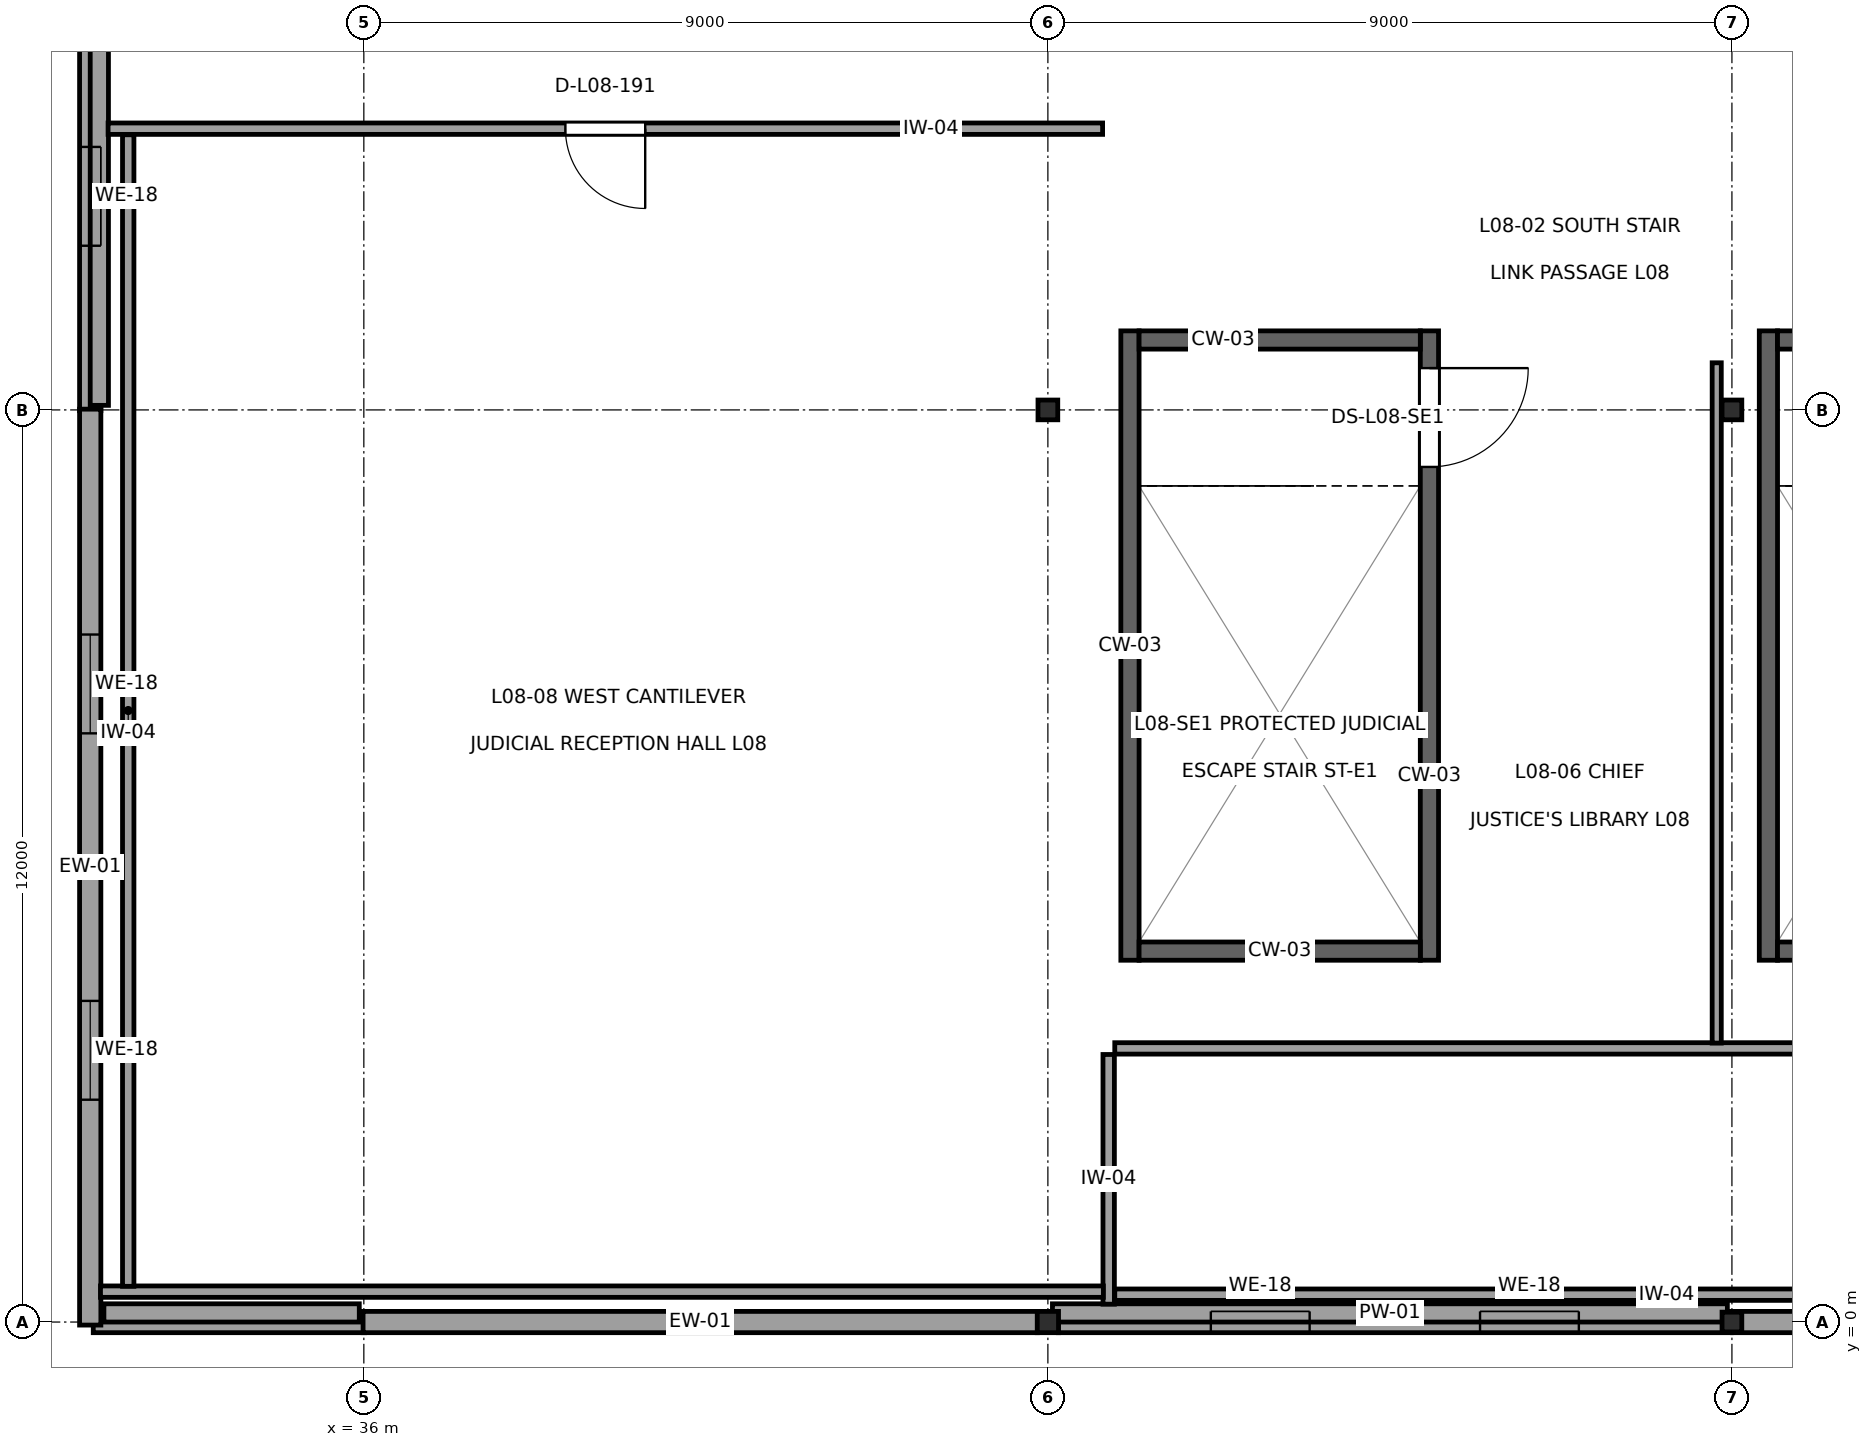
"""IFC4 building model, lengths in metres.
Left out: names, types, materials, properties, quantities, classifications, styles, units other than length and angle.
Written with IfcOpenShell. Run it as: python <this file> out.ifc"""

import sys

from ifc_helpers import new_model, si_unit, direction, frame, frame_2d, origin, origin_2d, place, context, subcontext, project, spatial, rectangle, i_section, extrude, element, fill, save


model = new_model("IFC4")
c1 = context("Model", 3, precision=1e-05, world=origin(), true_north=direction((0.0, 1.0)))
c2 = subcontext(c1, "Body", "Model", "MODEL_VIEW")
j1 = project(units=[si_unit("LENGTHUNIT", "METRE"), si_unit("PLANEANGLEUNIT", "RADIAN")], contexts=[c1])
p1 = place(None, origin())
s1 = spatial("IfcSite", under=j1, at=p1, CompositionType="ELEMENT")
p2 = place(p1, origin())
s2 = spatial("IfcBuilding", under=s1, at=p2, CompositionType="ELEMENT")
p3 = place(p2, frame((0.0, 0.0, 35.4)))
s3 = spatial("IfcBuildingStorey", under=s2, at=p3, CompositionType="ELEMENT", Elevation=35.4)
p4 = place(p3, frame((45.0, 0.0, 0.0), z_axis=(0.0, 0.0, 1.0), x_axis=(0.0, 1.0, 0.0)))
e1 = element("IfcColumn", 1, at=p4, inside=s3, PredefinedType="COLUMN", context=c2, shape_type="SweptSolid", body=[
    extrude(i_section(OverallWidth=0.28, OverallDepth=0.28, WebThickness=0.01, FlangeThickness=0.018, at=origin_2d()), origin(), (0.0, 0.0, 1.0), 3.8),
])
for number, where, z_axis, x_axis in (
    (2, (45.0, 12.0, 0.0), (0.0, 0.0, 1.0), (1.0, 0.0, 0.0)),
    (3, (54.0, 0.0, 0.0), (0.0, 0.0, 1.0), (1.0, 0.0, 0.0)),
    (4, (54.0, 12.0, 0.0), (0.0, 0.0, 1.0), (1.0, 0.0, 0.0)),
):
    element("IfcColumn", number, at=place(p3, frame(where, z_axis=z_axis, x_axis=x_axis)), inside=s3, PredefinedType="COLUMN", context=c2, shape_type="SweptSolid", body=[
        extrude(i_section(OverallWidth=0.26, OverallDepth=0.26, WebThickness=0.01, FlangeThickness=0.018, at=origin_2d()), origin(), (0.0, 0.0, 1.0), 3.8),
    ])
p5 = place(p3, frame((32.44, 0.0, 0.0), z_axis=(0.0, 0.0, 1.0), x_axis=(1.0, 0.0, 0.0)))
e5 = element("IfcWall", 5, at=p5, inside=s3, PredefinedType="SOLIDWALL", context=c2, shape_type="SweptSolid", body=[
    extrude(rectangle(XDim=3.57, YDim=0.28, at=frame_2d((1.785, 0.0))), origin(), (0.0, 0.0, 1.0), 2.787),
])
p6 = place(p3, frame((35.99, 0.0, 0.0), z_axis=(0.0, 0.0, 1.0), x_axis=(1.0, 0.0, 0.0)))
e6 = element("IfcWall", 6, at=p6, inside=s3, PredefinedType="SOLIDWALL", context=c2, shape_type="SweptSolid", body=[
    extrude(rectangle(XDim=8.872, YDim=0.28, at=frame_2d((4.436, 0.0))), origin(), (0.0, 0.0, 1.0), 2.787),
])
p7 = place(p3, frame((45.138, 0.0, 0.0), z_axis=(0.0, 0.0, 1.0), x_axis=(1.0, 0.0, 0.0)))
e7 = element("IfcWall", 7, at=p7, inside=s3, PredefinedType="SOLIDWALL", context=c2, shape_type="SweptSolid", body=[
    extrude(rectangle(XDim=8.854, YDim=0.28, at=frame_2d((4.427, 0.0))), origin(), (0.0, 0.0, 1.0), 2.787),
])
p8 = place(p7, frame((2.006, 0.0, 1.05)))
e8 = element("IfcOpeningElement", 8, at=p8, cuts=e7, PredefinedType="OPENING", context=c2, shape_type="SweptSolid", body=[
    extrude(rectangle(XDim=1.3, YDim=1.3, at=frame_2d((0.65, 0.65))), frame((0.0, 0.155, 0.0), z_axis=(0.0, -1.0, 0.0), x_axis=(1.0, 0.0, 0.0)), (0.0, 0.0, 1.0), 0.31),
])
p9 = place(p7, frame((5.548, 0.0, 1.05)))
e9 = element("IfcOpeningElement", 9, at=p9, cuts=e7, PredefinedType="OPENING", context=c2, shape_type="SweptSolid", body=[
    extrude(rectangle(XDim=1.3, YDim=1.3, at=frame_2d((0.65, 0.65))), frame((0.0, 0.155, 0.0), z_axis=(0.0, -1.0, 0.0), x_axis=(1.0, 0.0, 0.0)), (0.0, 0.0, 1.0), 0.31),
])
p10 = place(p3, frame((54.008, 0.0, 0.0), z_axis=(0.0, 0.0, 1.0), x_axis=(1.0, 0.0, 0.0)))
e10 = element("IfcWall", 10, at=p10, inside=s3, PredefinedType="SOLIDWALL", context=c2, shape_type="SweptSolid", body=[
    extrude(rectangle(XDim=8.984, YDim=0.28, at=frame_2d((4.492, 0.0))), origin(), (0.0, 0.0, 1.0), 2.787),
])
p11 = place(p10, frame((2.045, 0.0, 1.05)))
e11 = element("IfcOpeningElement", 11, at=p11, cuts=e10, PredefinedType="OPENING", context=c2, shape_type="SweptSolid", body=[
    extrude(rectangle(XDim=1.3, YDim=1.3, at=frame_2d((0.65, 0.65))), frame((0.0, 0.155, 0.0), z_axis=(0.0, -1.0, 0.0), x_axis=(1.0, 0.0, 0.0)), (0.0, 0.0, 1.0), 0.31),
])
p12 = place(p10, frame((5.639, 0.0, 1.05)))
e12 = element("IfcOpeningElement", 12, at=p12, cuts=e10, PredefinedType="OPENING", context=c2, shape_type="SweptSolid", body=[
    extrude(rectangle(XDim=1.3, YDim=1.3, at=frame_2d((0.65, 0.65))), frame((0.0, 0.155, 0.0), z_axis=(0.0, -1.0, 0.0), x_axis=(1.0, 0.0, 0.0)), (0.0, 0.0, 1.0), 0.31),
])
p13 = place(p3, frame((32.4, 23.96, 0.0), z_axis=(0.0, 0.0, 1.0), x_axis=(0.0, -1.0, 0.0)))
e13 = element("IfcWall", 13, at=p13, inside=s3, PredefinedType="SOLIDWALL", context=c2, shape_type="SweptSolid", body=[
    extrude(rectangle(XDim=11.97, YDim=0.28, at=frame_2d((5.985, 0.0))), origin(), (0.0, 0.0, 1.0), 3.095),
])
p14 = place(p13, frame((2.941, 0.0, 1.05)))
e14 = element("IfcOpeningElement", 14, at=p14, cuts=e13, PredefinedType="OPENING", context=c2, shape_type="SweptSolid", body=[
    extrude(rectangle(XDim=1.3, YDim=1.3, at=frame_2d((0.65, 0.65))), frame((0.0, 0.155, 0.0), z_axis=(0.0, -1.0, 0.0), x_axis=(1.0, 0.0, 0.0)), (0.0, 0.0, 1.0), 0.31),
])
p15 = place(p13, frame((8.5, 0.0, 1.05)))
e15 = element("IfcOpeningElement", 15, at=p15, cuts=e13, PredefinedType="OPENING", context=c2, shape_type="SweptSolid", body=[
    extrude(rectangle(XDim=1.3, YDim=1.3, at=frame_2d((0.65, 0.65))), frame((0.0, 0.155, 0.0), z_axis=(0.0, -1.0, 0.0), x_axis=(1.0, 0.0, 0.0)), (0.0, 0.0, 1.0), 0.31),
])
p16 = place(p3, frame((32.4, 12.01, 0.0), z_axis=(0.0, 0.0, 1.0), x_axis=(0.0, -1.0, 0.0)))
e16 = element("IfcWall", 16, at=p16, inside=s3, PredefinedType="SOLIDWALL", context=c2, shape_type="SweptSolid", body=[
    extrude(rectangle(XDim=12.05, YDim=0.28, at=frame_2d((6.025, 0.0))), origin(), (0.0, 0.0, 1.0), 3.095),
])
p17 = place(p16, frame((2.965, 0.0, 1.05)))
e17 = element("IfcOpeningElement", 17, at=p17, cuts=e16, PredefinedType="OPENING", context=c2, shape_type="SweptSolid", body=[
    extrude(rectangle(XDim=1.3, YDim=1.3, at=frame_2d((0.65, 0.65))), frame((0.0, 0.155, 0.0), z_axis=(0.0, -1.0, 0.0), x_axis=(1.0, 0.0, 0.0)), (0.0, 0.0, 1.0), 0.31),
])
p18 = place(p16, frame((7.785, 0.0, 1.05)))
e18 = element("IfcOpeningElement", 18, at=p18, cuts=e16, PredefinedType="OPENING", context=c2, shape_type="SweptSolid", body=[
    extrude(rectangle(XDim=1.3, YDim=1.3, at=frame_2d((0.65, 0.65))), frame((0.0, 0.155, 0.0), z_axis=(0.0, -1.0, 0.0), x_axis=(1.0, 0.0, 0.0)), (0.0, 0.0, 1.0), 0.31),
])
p19 = place(p3, frame((32.58, 0.12, 3.8), z_axis=(0.0, 0.0, 1.0), x_axis=(1.0, 0.0, 0.0)))
e19 = element("IfcWall", 19, at=p19, inside=s3, PredefinedType="PARAPET", context=c2, shape_type="SweptSolid", body=[
    extrude(rectangle(XDim=3.36, YDim=0.24, at=frame_2d((1.68, 0.0))), origin(), (0.0, 0.0, 1.0), 1.1),
])
p20 = place(p3, frame((45.06, 0.12, 3.8), z_axis=(0.0, 0.0, 1.0), x_axis=(1.0, 0.0, 0.0)))
e20 = element("IfcWall", 20, at=p20, inside=s3, PredefinedType="PARAPET", context=c2, shape_type="SweptSolid", body=[
    extrude(rectangle(XDim=8.88, YDim=0.24, at=frame_2d((4.44, 0.0))), origin(), (0.0, 0.0, 1.0), 1.1),
])
p21 = place(p3, frame((32.52, 23.58, 3.8), z_axis=(0.0, 0.0, 1.0), x_axis=(0.0, -1.0, 0.0)))
e21 = element("IfcWall", 21, at=p21, inside=s3, PredefinedType="PARAPET", context=c2, shape_type="SweptSolid", body=[
    extrude(rectangle(XDim=11.52, YDim=0.24, at=frame_2d((5.76, 0.0))), origin(), (0.0, 0.0, 1.0), 1.1),
])
p22 = place(p3, frame((54.48, 4.76, 0.0), z_axis=(0.0, 0.0, 1.0), x_axis=(0.0, 1.0, 0.0)))
e22 = element("IfcWall", 22, at=p22, inside=s3, PredefinedType="SHEAR", context=c2, shape_type="SweptSolid", body=[
    extrude(rectangle(XDim=8.28, YDim=0.24, at=frame_2d((4.14, 0.0))), origin(), (0.0, 0.0, 1.0), 3.81),
])
for number, where, z_axis, x_axis in (
    (23, (54.6, 4.88, 0.0), (0.0, 0.0, 1.0), (1.0, 0.0, 0.0)),
    (24, (54.6, 12.92, 0.0), (0.0, 0.0, 1.0), (1.0, 0.0, 0.0)),
):
    element("IfcWall", number, at=place(p3, frame(where, z_axis=z_axis, x_axis=x_axis)), inside=s3, PredefinedType="SHEAR", context=c2, shape_type="SweptSolid", body=[
        extrude(rectangle(XDim=3.7, YDim=0.24, at=frame_2d((1.85, 0.0))), origin(), (0.0, 0.0, 1.0), 3.81),
    ])
p23 = place(p3, frame((46.08, 4.76, 0.0), z_axis=(0.0, 0.0, 1.0), x_axis=(0.0, 1.0, 0.0)))
e25 = element("IfcWall", 25, at=p23, inside=s3, PredefinedType="SHEAR", context=c2, shape_type="SweptSolid", body=[
    extrude(rectangle(XDim=8.28, YDim=0.24, at=frame_2d((4.14, 0.0))), origin(), (0.0, 0.0, 1.0), 3.81),
])
p24 = place(p3, frame((50.02, 4.76, 0.0), z_axis=(0.0, 0.0, 1.0), x_axis=(0.0, 1.0, 0.0)))
e26 = element("IfcWall", 26, at=p24, inside=s3, PredefinedType="SHEAR", context=c2, shape_type="SweptSolid", body=[
    extrude(rectangle(XDim=8.28, YDim=0.24, at=frame_2d((4.14, 0.0))), origin(), (0.0, 0.0, 1.0), 3.81),
])
p25 = place(p24, frame((6.49, 0.0, 0.0)))
e27 = element("IfcOpeningElement", 27, at=p25, cuts=e26, PredefinedType="OPENING", context=c2, shape_type="SweptSolid", body=[
    extrude(rectangle(XDim=1.3, YDim=2.2, at=frame_2d((0.65, 1.1))), frame((0.0, 0.135, 0.0), z_axis=(0.0, -1.0, 0.0), x_axis=(1.0, 0.0, 0.0)), (0.0, 0.0, 1.0), 0.27),
])
for number, where, z_axis, x_axis in (
    (28, (46.2, 4.88, 0.0), (0.0, 0.0, 1.0), (1.0, 0.0, 0.0)),
    (29, (46.2, 12.92, 0.0), (0.0, 0.0, 1.0), (1.0, 0.0, 0.0)),
):
    element("IfcWall", number, at=place(p3, frame(where, z_axis=z_axis, x_axis=x_axis)), inside=s3, PredefinedType="SHEAR", context=c2, shape_type="SweptSolid", body=[
        extrude(rectangle(XDim=3.7, YDim=0.24, at=frame_2d((1.85, 0.0))), origin(), (0.0, 0.0, 1.0), 3.81),
    ])
p26 = place(p3, frame((71.92, 0.36, 0.0), z_axis=(0.0, 0.0, 1.0), x_axis=(-1.0, 0.0, 0.0)))
e30 = element("IfcWall", 30, at=p26, inside=s3, PredefinedType="PARTITIONING", context=c2, shape_type="SweptSolid", body=[
    extrude(rectangle(XDim=26.04, YDim=0.15, at=frame_2d((13.02, 0.0))), origin(), (0.0, 0.0, 1.0), 3.64),
])
p27 = place(p3, frame((45.8, 0.235, 0.0), z_axis=(0.0, 0.0, 1.0), x_axis=(0.0, 1.0, 0.0)))
e31 = element("IfcWall", 31, at=p27, inside=s3, PredefinedType="PARTITIONING", context=c2, shape_type="SweptSolid", body=[
    extrude(rectangle(XDim=3.285, YDim=0.15, at=frame_2d((1.643, 0.0))), origin(), (0.0, 0.0, 1.0), 3.64),
])
p28 = place(p3, frame((45.88, 3.6, 0.0), z_axis=(0.0, 0.0, 1.0), x_axis=(1.0, 0.0, 0.0)))
e32 = element("IfcWall", 32, at=p28, inside=s3, PredefinedType="PARTITIONING", context=c2, shape_type="SweptSolid", body=[
    extrude(rectangle(XDim=58.24, YDim=0.15, at=frame_2d((29.12, 0.0))), origin(), (0.0, 0.0, 1.0), 3.64),
])
p29 = place(p28, frame((27.795, 0.0, 0.0)))
e33 = element("IfcOpeningElement", 33, at=p29, cuts=e32, PredefinedType="OPENING", context=c2, shape_type="SweptSolid", body=[
    extrude(rectangle(XDim=1.05, YDim=2.25, at=frame_2d((0.525, 1.125))), frame((0.0, 0.09, 0.0), z_axis=(0.0, -1.0, 0.0), x_axis=(1.0, 0.0, 0.0)), (0.0, 0.0, 1.0), 0.18),
])
p30 = place(p3, frame((53.8, 12.62, 0.0), z_axis=(0.0, 0.0, 1.0), x_axis=(0.0, -1.0, 0.0)))
e34 = element("IfcWall", 34, at=p30, inside=s3, PredefinedType="PARTITIONING", context=c2, shape_type="SweptSolid", body=[
    extrude(rectangle(XDim=8.95, YDim=0.12, at=frame_2d((4.475, 0.0))), origin(), (0.0, 0.0, 1.0), 3.305),
])
p31 = place(p3, frame((45.73, 0.4, 0.0), z_axis=(0.0, 0.0, 1.0), x_axis=(-1.0, 0.0, 0.0)))
e35 = element("IfcWall", 35, at=p31, inside=s3, PredefinedType="PARTITIONING", context=c2, shape_type="SweptSolid", body=[
    extrude(rectangle(XDim=13.195, YDim=0.15, at=frame_2d((6.598, 0.0))), origin(), (0.0, 0.0, 1.0), 3.64),
])
p32 = place(p3, frame((32.9, 0.47, 0.0), z_axis=(0.0, 0.0, 1.0), x_axis=(0.0, 1.0, 0.0)))
e36 = element("IfcWall", 36, at=p32, inside=s3, PredefinedType="PARTITIONING", context=c2, shape_type="SweptSolid", body=[
    extrude(rectangle(XDim=15.15, YDim=0.15, at=frame_2d((7.575, 0.0))), origin(), (0.0, 0.0, 1.0), 3.64),
])
p33 = place(p3, frame((32.635, 15.7, 0.0), z_axis=(0.0, 0.0, 1.0), x_axis=(1.0, 0.0, 0.0)))
e37 = element("IfcWall", 37, at=p33, inside=s3, PredefinedType="PARTITIONING", context=c2, shape_type="SweptSolid", body=[
    extrude(rectangle(XDim=13.085, YDim=0.15, at=frame_2d((6.542, 0.0))), origin(), (0.0, 0.0, 1.0), 3.64),
])
p34 = place(p33, frame((6.017, 0.0, 0.0)))
e38 = element("IfcOpeningElement", 38, at=p34, cuts=e37, PredefinedType="OPENING", context=c2, shape_type="SweptSolid", body=[
    extrude(rectangle(XDim=1.05, YDim=2.25, at=frame_2d((0.525, 1.125))), frame((0.0, 0.09, 0.0), z_axis=(0.0, -1.0, 0.0), x_axis=(1.0, 0.0, 0.0)), (0.0, 0.0, 1.0), 0.18),
])
p35 = place(p8, origin())
e39 = element("IfcWindow", 39, at=p35, inside=s3, PartitioningType="SINGLE_PANEL", PredefinedType="WINDOW", context=c2, shape_type="SweptSolid", body=[
    extrude(rectangle(XDim=1.3, YDim=1.3, at=frame_2d((0.65, 0.65))), frame((0.0, 0.03, 0.0), z_axis=(0.0, -1.0, 0.0), x_axis=(1.0, 0.0, 0.0)), (0.0, 0.0, 1.0), 0.06),
])
fill(e8, e39)
p36 = place(p9, origin())
e40 = element("IfcWindow", 40, at=p36, inside=s3, PartitioningType="SINGLE_PANEL", PredefinedType="WINDOW", context=c2, shape_type="SweptSolid", body=[
    extrude(rectangle(XDim=1.3, YDim=1.3, at=frame_2d((0.65, 0.65))), frame((0.0, 0.03, 0.0), z_axis=(0.0, -1.0, 0.0), x_axis=(1.0, 0.0, 0.0)), (0.0, 0.0, 1.0), 0.06),
])
fill(e9, e40)
p37 = place(p15, origin())
e41 = element("IfcWindow", 41, at=p37, inside=s3, PartitioningType="SINGLE_PANEL", PredefinedType="WINDOW", context=c2, shape_type="SweptSolid", body=[
    extrude(rectangle(XDim=1.3, YDim=1.3, at=frame_2d((0.65, 0.65))), frame((0.0, 0.03, 0.0), z_axis=(0.0, -1.0, 0.0), x_axis=(1.0, 0.0, 0.0)), (0.0, 0.0, 1.0), 0.06),
])
fill(e15, e41)
p38 = place(p17, origin())
e42 = element("IfcWindow", 42, at=p38, inside=s3, PartitioningType="SINGLE_PANEL", PredefinedType="WINDOW", context=c2, shape_type="SweptSolid", body=[
    extrude(rectangle(XDim=1.3, YDim=1.3, at=frame_2d((0.65, 0.65))), frame((0.0, 0.03, 0.0), z_axis=(0.0, -1.0, 0.0), x_axis=(1.0, 0.0, 0.0)), (0.0, 0.0, 1.0), 0.06),
])
fill(e17, e42)
p39 = place(p18, origin())
e43 = element("IfcWindow", 43, at=p39, inside=s3, PartitioningType="SINGLE_PANEL", PredefinedType="WINDOW", context=c2, shape_type="SweptSolid", body=[
    extrude(rectangle(XDim=1.3, YDim=1.3, at=frame_2d((0.65, 0.65))), frame((0.0, 0.03, 0.0), z_axis=(0.0, -1.0, 0.0), x_axis=(1.0, 0.0, 0.0)), (0.0, 0.0, 1.0), 0.06),
])
fill(e18, e43)
p40 = place(p25, frame((1.3, 0.0, 0.0), z_axis=(0.0, 0.0, 1.0), x_axis=(-1.0, 0.0, 0.0)))
e44 = element("IfcDoor", 44, at=p40, inside=s3, OperationType="SINGLE_SWING_RIGHT", PredefinedType="DOOR", context=c2, shape_type="SweptSolid", body=[
    extrude(rectangle(XDim=1.3, YDim=2.2, at=frame_2d((0.65, 1.1))), frame((0.0, 0.025, 0.0), z_axis=(0.0, -1.0, 0.0), x_axis=(1.0, 0.0, 0.0)), (0.0, 0.0, 1.0), 0.05),
])
fill(e27, e44)
p41 = place(p34, frame((1.05, 0.0, 0.0), z_axis=(0.0, 0.0, 1.0), x_axis=(-1.0, 0.0, 0.0)))
e45 = element("IfcDoor", 45, at=p41, inside=s3, OperationType="SINGLE_SWING_RIGHT", PredefinedType="DOOR", context=c2, shape_type="SweptSolid", body=[
    extrude(rectangle(XDim=1.05, YDim=2.25, at=frame_2d((0.525, 1.125))), frame((0.0, 0.025, 0.0), z_axis=(0.0, -1.0, 0.0), x_axis=(1.0, 0.0, 0.0)), (0.0, 0.0, 1.0), 0.05),
])
fill(e38, e45)
save(model, sys.argv[1])
